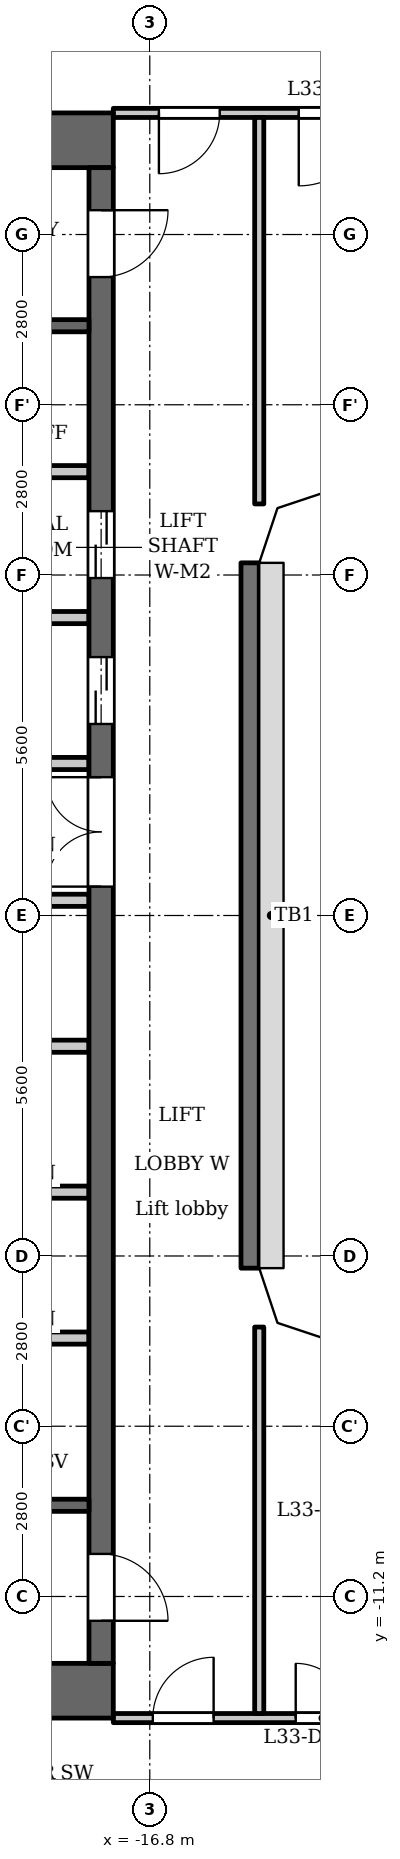
"""IFC4 building model, lengths in metres.
Left out: names, types, materials, properties, quantities, classifications, styles, units other than length and angle.
Written with IfcOpenShell. Run it as: python <this file> out.ifc"""

import sys

from ifc_helpers import new_model, si_unit, direction, frame, frame_2d, origin, place, context, subcontext, project, spatial, polyline, rectangle, outline, extrude, element, fill, save


model = new_model("IFC4")
c1 = context("Model", 3, precision=1e-05, world=origin(), true_north=direction((0.0, 1.0)))
c2 = subcontext(c1, "Body", "Model", "MODEL_VIEW")
j1 = project(units=[si_unit("LENGTHUNIT", "METRE"), si_unit("PLANEANGLEUNIT", "RADIAN")], contexts=[c1])
p1 = place(None, origin())
s1 = spatial("IfcSite", under=j1, at=p1, CompositionType="ELEMENT")
p2 = place(p1, origin())
s2 = spatial("IfcBuilding", under=s1, at=p2, CompositionType="ELEMENT")
p3 = place(p2, frame((0.0, 0.0, 130.7)))
s3 = spatial("IfcBuildingStorey", under=s2, at=p3, CompositionType="ELEMENT", Elevation=130.7)
p4 = place(p3, frame((-15.15, -5.8, 0.0), z_axis=(0.0, 0.0, 1.0), x_axis=(0.0, 1.0, 0.0)))
e1 = element("IfcWall", 1, at=p4, inside=s3, PredefinedType="SOLIDWALL", context=c2, shape_type="SweptSolid", body=[
    extrude(rectangle(XDim=11.6, YDim=0.3, at=frame_2d((5.8, 0.0))), origin(), (0.0, 0.0, 1.0), 5.1),
])
for number, where, z_axis, x_axis in (
    (2, (-17.4, 12.75, 0.0), (0.0, 0.0, 1.0), (-1.0, 0.0, 0.0)),
    (3, (-17.4, -12.75, 0.0), (0.0, 0.0, 1.0), (-1.0, 0.0, 0.0)),
):
    element("IfcWall", number, at=place(p3, frame(where, z_axis=z_axis, x_axis=x_axis)), inside=s3, PredefinedType="SHEAR", context=c2, shape_type="SweptSolid", body=[
        extrude(rectangle(XDim=10.4, YDim=0.9, at=frame_2d((5.2, 0.0))), origin(), (0.0, 0.0, 1.0), 5.1),
    ])
p5 = place(p3, frame((-17.6, -12.3, 0.0), z_axis=(0.0, 0.0, 1.0), x_axis=(0.0, 1.0, 0.0)))
e4 = element("IfcWall", 4, at=p5, inside=s3, PredefinedType="SHEAR", context=c2, shape_type="SweptSolid", body=[
    extrude(rectangle(XDim=24.6, YDim=0.4, at=frame_2d((12.3, 0.0))), origin(), (0.0, 0.0, 1.0), 5.1),
])
p6 = place(p5, frame((15.45, 0.0, 0.0)))
e5 = element("IfcOpeningElement", 5, at=p6, cuts=e4, PredefinedType="OPENING", context=c2, shape_type="SweptSolid", body=[
    extrude(rectangle(XDim=1.1, YDim=2.1, at=frame_2d((0.55, 1.05))), frame((0.0, 0.21, 0.0), z_axis=(0.0, -1.0, 0.0), x_axis=(1.0, 0.0, 0.0)), (0.0, 0.0, 1.0), 0.42),
])
p7 = place(p5, frame((17.85, 0.0, 0.0)))
e6 = element("IfcOpeningElement", 6, at=p7, cuts=e4, PredefinedType="OPENING", context=c2, shape_type="SweptSolid", body=[
    extrude(rectangle(XDim=1.1, YDim=2.1, at=frame_2d((0.55, 1.05))), frame((0.0, 0.21, 0.0), z_axis=(0.0, -1.0, 0.0), x_axis=(1.0, 0.0, 0.0)), (0.0, 0.0, 1.0), 0.42),
])
p8 = place(p5, frame((22.8, 0.0, 0.0)))
e7 = element("IfcOpeningElement", 7, at=p8, cuts=e4, PredefinedType="OPENING", context=c2, shape_type="SweptSolid", body=[
    extrude(rectangle(XDim=1.1, YDim=2.1, at=frame_2d((0.55, 1.05))), frame((0.0, 0.21, 0.0), z_axis=(0.0, -1.0, 0.0), x_axis=(1.0, 0.0, 0.0)), (0.0, 0.0, 1.0), 0.42),
])
p9 = place(p5, frame((0.7, 0.0, 0.0)))
e8 = element("IfcOpeningElement", 8, at=p9, cuts=e4, PredefinedType="OPENING", context=c2, shape_type="SweptSolid", body=[
    extrude(rectangle(XDim=1.1, YDim=2.1, at=frame_2d((0.55, 1.05))), frame((0.0, 0.21, 0.0), z_axis=(0.0, -1.0, 0.0), x_axis=(1.0, 0.0, 0.0)), (0.0, 0.0, 1.0), 0.42),
])
p10 = place(p5, frame((12.775, 0.0, 0.0)))
e9 = element("IfcOpeningElement", 9, at=p10, cuts=e4, PredefinedType="OPENING", context=c2, shape_type="SweptSolid", body=[
    extrude(rectangle(XDim=1.8, YDim=2.1, at=frame_2d((0.9, 1.05))), frame((0.0, 0.21, 0.0), z_axis=(0.0, -1.0, 0.0), x_axis=(1.0, 0.0, 0.0)), (0.0, 0.0, 1.0), 0.42),
])
p11 = place(p3, frame((-17.8, -9.7, 0.0), z_axis=(0.0, 0.0, 1.0), x_axis=(-1.0, 0.0, 0.0)))
e10 = element("IfcWall", 10, at=p11, inside=s3, PredefinedType="SHEAR", context=c2, shape_type="SweptSolid", body=[
    extrude(rectangle(XDim=8.3, YDim=0.2, at=frame_2d((4.15, 0.0))), origin(), (0.0, 0.0, 1.0), 5.1),
])
p12 = place(p11, frame((0.85, 0.0, 0.0)))
e11 = element("IfcOpeningElement", 11, at=p12, cuts=e10, PredefinedType="OPENING", context=c2, shape_type="SweptSolid", body=[
    extrude(rectangle(XDim=1.1, YDim=2.1, at=frame_2d((0.55, 1.05))), frame((0.0, 0.11, 0.0), z_axis=(0.0, -1.0, 0.0), x_axis=(1.0, 0.0, 0.0)), (0.0, 0.0, 1.0), 0.22),
])
p13 = place(p11, frame((3.75, 0.0, 0.0)))
e12 = element("IfcOpeningElement", 12, at=p13, cuts=e10, PredefinedType="OPENING", context=c2, shape_type="SweptSolid", body=[
    extrude(rectangle(XDim=1.1, YDim=2.1, at=frame_2d((0.55, 1.05))), frame((0.0, 0.11, 0.0), z_axis=(0.0, -1.0, 0.0), x_axis=(1.0, 0.0, 0.0)), (0.0, 0.0, 1.0), 0.22),
])
for number, where, z_axis, x_axis in (
    (13, (-17.8, -6.95, 0.0), (0.0, 0.0, 1.0), (-1.0, 0.0, 0.0)),
    (14, (-17.8, -4.55, 0.0), (0.0, 0.0, 1.0), (-1.0, 0.0, 0.0)),
    (15, (-17.8, -2.15, 0.0), (0.0, 0.0, 1.0), (-1.0, 0.0, 0.0)),
):
    element("IfcWall", number, at=place(p3, frame(where, z_axis=z_axis, x_axis=x_axis)), inside=s3, PredefinedType="PARTITIONING", context=c2, shape_type="SweptSolid", body=[
        extrude(rectangle(XDim=2.8, YDim=0.2, at=frame_2d((1.4, 0.0))), origin(), (0.0, 0.0, 1.0), 5.1),
    ])
for number, where, z_axis, x_axis in (
    (16, (-17.8, 0.25, 0.0), (0.0, 0.0, 1.0), (-1.0, 0.0, 0.0)),
    (17, (-17.8, 2.5, 0.0), (0.0, 0.0, 1.0), (-1.0, 0.0, 0.0)),
):
    element("IfcWall", number, at=place(p3, frame(where, z_axis=z_axis, x_axis=x_axis)), inside=s3, PredefinedType="PARTITIONING", context=c2, shape_type="SweptSolid", body=[
        extrude(rectangle(XDim=3.0, YDim=0.2, at=frame_2d((1.5, 0.0))), origin(), (0.0, 0.0, 1.0), 5.1),
    ])
for number, where, z_axis, x_axis in (
    (18, (-17.8, 4.9, 0.0), (0.0, 0.0, 1.0), (-1.0, 0.0, 0.0)),
    (19, (-17.8, 7.3, 0.0), (0.0, 0.0, 1.0), (-1.0, 0.0, 0.0)),
):
    element("IfcWall", number, at=place(p3, frame(where, z_axis=z_axis, x_axis=x_axis)), inside=s3, PredefinedType="PARTITIONING", context=c2, shape_type="SweptSolid", body=[
        extrude(rectangle(XDim=2.8, YDim=0.2, at=frame_2d((1.4, 0.0))), origin(), (0.0, 0.0, 1.0), 5.1),
    ])
p14 = place(p3, frame((-17.8, 9.7, 0.0), z_axis=(0.0, 0.0, 1.0), x_axis=(-1.0, 0.0, 0.0)))
e20 = element("IfcWall", 20, at=p14, inside=s3, PredefinedType="SHEAR", context=c2, shape_type="SweptSolid", body=[
    extrude(rectangle(XDim=8.3, YDim=0.2, at=frame_2d((4.15, 0.0))), origin(), (0.0, 0.0, 1.0), 5.1),
])
p15 = place(p14, frame((0.85, 0.0, 0.0)))
e21 = element("IfcOpeningElement", 21, at=p15, cuts=e20, PredefinedType="OPENING", context=c2, shape_type="SweptSolid", body=[
    extrude(rectangle(XDim=1.1, YDim=2.1, at=frame_2d((0.55, 1.05))), frame((0.0, 0.11, 0.0), z_axis=(0.0, -1.0, 0.0), x_axis=(1.0, 0.0, 0.0)), (0.0, 0.0, 1.0), 0.22),
])
p16 = place(p14, frame((3.75, 0.0, 0.0)))
e22 = element("IfcOpeningElement", 22, at=p16, cuts=e20, PredefinedType="OPENING", context=c2, shape_type="SweptSolid", body=[
    extrude(rectangle(XDim=1.1, YDim=2.1, at=frame_2d((0.55, 1.05))), frame((0.0, 0.11, 0.0), z_axis=(0.0, -1.0, 0.0), x_axis=(1.0, 0.0, 0.0)), (0.0, 0.0, 1.0), 0.22),
])
p17 = place(p3, frame((-17.4, -13.2, 0.0), z_axis=(0.0, 0.0, 1.0), x_axis=(1.0, 0.0, 0.0)))
e23 = element("IfcWall", 23, at=p17, inside=s3, PredefinedType="PARTITIONING", context=c2, shape_type="SweptSolid", body=[
    extrude(rectangle(XDim=5.88, YDim=0.15, at=frame_2d((2.94, 0.0))), origin(), (0.0, 0.0, 1.0), 5.1),
])
p18 = place(p17, frame((0.65, 0.0, 0.0)))
e24 = element("IfcOpeningElement", 24, at=p18, cuts=e23, PredefinedType="OPENING", context=c2, shape_type="SweptSolid", body=[
    extrude(rectangle(XDim=1.0, YDim=2.1, at=frame_2d((0.5, 1.05))), frame((0.0, 0.085, 0.0), z_axis=(0.0, -1.0, 0.0), x_axis=(1.0, 0.0, 0.0)), (0.0, 0.0, 1.0), 0.17),
])
p19 = place(p17, frame((4.81, 0.0, 0.0)))
e25 = element("IfcOpeningElement", 25, at=p19, cuts=e23, PredefinedType="OPENING", context=c2, shape_type="SweptSolid", body=[
    extrude(rectangle(XDim=0.9, YDim=2.1, at=frame_2d((0.45, 1.05))), frame((0.0, 0.085, 0.0), z_axis=(0.0, -1.0, 0.0), x_axis=(1.0, 0.0, 0.0)), (0.0, 0.0, 1.0), 0.17),
])
p20 = place(p17, frame((3.0, 0.0, 0.0)))
e26 = element("IfcOpeningElement", 26, at=p20, cuts=e23, PredefinedType="OPENING", context=c2, shape_type="SweptSolid", body=[
    extrude(rectangle(XDim=0.9, YDim=2.1, at=frame_2d((0.45, 1.05))), frame((0.0, 0.085, 0.0), z_axis=(0.0, -1.0, 0.0), x_axis=(1.0, 0.0, 0.0)), (0.0, 0.0, 1.0), 0.17),
])
p21 = place(p3, frame((-17.4, 13.2, 0.0), z_axis=(0.0, 0.0, 1.0), x_axis=(1.0, 0.0, 0.0)))
e27 = element("IfcWall", 27, at=p21, inside=s3, PredefinedType="PARTITIONING", context=c2, shape_type="SweptSolid", body=[
    extrude(rectangle(XDim=5.88, YDim=0.15, at=frame_2d((2.94, 0.0))), origin(), (0.0, 0.0, 1.0), 5.1),
])
p22 = place(p21, frame((0.75, 0.0, 0.0)))
e28 = element("IfcOpeningElement", 28, at=p22, cuts=e27, PredefinedType="OPENING", context=c2, shape_type="SweptSolid", body=[
    extrude(rectangle(XDim=1.0, YDim=2.1, at=frame_2d((0.5, 1.05))), frame((0.0, 0.085, 0.0), z_axis=(0.0, -1.0, 0.0), x_axis=(1.0, 0.0, 0.0)), (0.0, 0.0, 1.0), 0.17),
])
p23 = place(p21, frame((3.05, 0.0, 0.0)))
e29 = element("IfcOpeningElement", 29, at=p23, cuts=e27, PredefinedType="OPENING", context=c2, shape_type="SweptSolid", body=[
    extrude(rectangle(XDim=1.2, YDim=2.1, at=frame_2d((0.6, 1.05))), frame((0.0, 0.085, 0.0), z_axis=(0.0, -1.0, 0.0), x_axis=(1.0, 0.0, 0.0)), (0.0, 0.0, 1.0), 0.17),
])
for number, where, z_axis, x_axis in (
    (30, (-15.0, -13.125, 0.0), (0.0, 0.0, 1.0), (0.0, 1.0, 0.0)),
    (31, (-15.0, 6.769, 0.0), (0.0, 0.0, 1.0), (0.0, 1.0, 0.0)),
):
    element("IfcWall", number, at=place(p3, frame(where, z_axis=z_axis, x_axis=x_axis)), inside=s3, PredefinedType="PARTITIONING", context=c2, shape_type="SweptSolid", body=[
        extrude(rectangle(XDim=6.356, YDim=0.15, at=frame_2d((3.178, 0.0))), origin(), (0.0, 0.0, 1.0), 5.1),
    ])
p24 = place(p3, origin())
e32 = element("IfcWall", 32, at=p24, inside=s3, PredefinedType="SOLIDWALL", context=c2, shape_type="SweptSolid", body=[
    extrude(outline(polyline([(-15.0, 5.8), (-14.7, 6.7), (-13.8, 7.0), (-13.8, 7.3), (-13.849, 7.3), (-14.937, 6.937), (-15.3, 5.849), (-15.3, 5.8), (-15.0, 5.8)])), origin(), (0.0, 0.0, 1.0), 5.1),
])
e33 = element("IfcWall", 33, at=p24, inside=s3, PredefinedType="SOLIDWALL", context=c2, shape_type="SweptSolid", body=[
    extrude(outline(polyline([(-13.8, -7.0), (-14.7, -6.7), (-15.0, -5.8), (-15.3, -5.8), (-15.3, -5.849), (-14.937, -6.937), (-13.849, -7.3), (-13.8, -7.3), (-13.8, -7.0)])), origin(), (0.0, 0.0, 1.0), 5.1),
])
p25 = place(p6, origin())
e34 = element("IfcDoor", 34, at=p25, inside=s3, OperationType="DOUBLE_DOOR_SLIDING", PredefinedType="DOOR", context=c2, shape_type="SweptSolid", body=[
    extrude(rectangle(XDim=1.1, YDim=2.1, at=frame_2d((0.55, 1.05))), frame((0.0, 0.025, 0.0), z_axis=(0.0, -1.0, 0.0), x_axis=(1.0, 0.0, 0.0)), (0.0, 0.0, 1.0), 0.05),
])
fill(e5, e34)
p26 = place(p7, origin())
e35 = element("IfcDoor", 35, at=p26, inside=s3, OperationType="DOUBLE_DOOR_SLIDING", PredefinedType="DOOR", context=c2, shape_type="SweptSolid", body=[
    extrude(rectangle(XDim=1.1, YDim=2.1, at=frame_2d((0.55, 1.05))), frame((0.0, 0.025, 0.0), z_axis=(0.0, -1.0, 0.0), x_axis=(1.0, 0.0, 0.0)), (0.0, 0.0, 1.0), 0.05),
])
fill(e6, e35)
p27 = place(p8, origin())
e36 = element("IfcDoor", 36, at=p27, inside=s3, OperationType="SINGLE_SWING_RIGHT", PredefinedType="DOOR", context=c2, shape_type="SweptSolid", body=[
    extrude(rectangle(XDim=1.1, YDim=2.1, at=frame_2d((0.55, 1.05))), frame((0.0, 0.025, 0.0), z_axis=(0.0, -1.0, 0.0), x_axis=(1.0, 0.0, 0.0)), (0.0, 0.0, 1.0), 0.05),
])
fill(e7, e36)
p28 = place(p9, origin())
e37 = element("IfcDoor", 37, at=p28, inside=s3, OperationType="SINGLE_SWING_LEFT", PredefinedType="DOOR", context=c2, shape_type="SweptSolid", body=[
    extrude(rectangle(XDim=1.1, YDim=2.1, at=frame_2d((0.55, 1.05))), frame((0.0, 0.025, 0.0), z_axis=(0.0, -1.0, 0.0), x_axis=(1.0, 0.0, 0.0)), (0.0, 0.0, 1.0), 0.05),
])
fill(e8, e37)
p29 = place(p10, origin())
e38 = element("IfcDoor", 38, at=p29, inside=s3, OperationType="DOUBLE_DOOR_SINGLE_SWING", PredefinedType="DOOR", context=c2, shape_type="SweptSolid", body=[
    extrude(rectangle(XDim=1.8, YDim=2.1, at=frame_2d((0.9, 1.05))), frame((0.0, 0.025, 0.0), z_axis=(0.0, -1.0, 0.0), x_axis=(1.0, 0.0, 0.0)), (0.0, 0.0, 1.0), 0.05),
])
fill(e9, e38)
p30 = place(p22, origin())
e39 = element("IfcDoor", 39, at=p30, inside=s3, OperationType="SINGLE_SWING_LEFT", PredefinedType="DOOR", context=c2, shape_type="SweptSolid", body=[
    extrude(rectangle(XDim=1.0, YDim=2.1, at=frame_2d((0.5, 1.05))), frame((0.0, 0.025, 0.0), z_axis=(0.0, -1.0, 0.0), x_axis=(1.0, 0.0, 0.0)), (0.0, 0.0, 1.0), 0.05),
])
fill(e28, e39)
p31 = place(p23, origin())
e40 = element("IfcDoor", 40, at=p31, inside=s3, OperationType="SINGLE_SWING_LEFT", PredefinedType="DOOR", context=c2, shape_type="SweptSolid", body=[
    extrude(rectangle(XDim=1.2, YDim=2.1, at=frame_2d((0.6, 1.05))), frame((0.0, 0.025, 0.0), z_axis=(0.0, -1.0, 0.0), x_axis=(1.0, 0.0, 0.0)), (0.0, 0.0, 1.0), 0.05),
])
fill(e29, e40)
p32 = place(p18, origin())
e41 = element("IfcDoor", 41, at=p32, inside=s3, OperationType="SINGLE_SWING_LEFT", PredefinedType="DOOR", context=c2, shape_type="SweptSolid", body=[
    extrude(rectangle(XDim=1.0, YDim=2.1, at=frame_2d((0.5, 1.05))), frame((0.0, 0.025, 0.0), z_axis=(0.0, -1.0, 0.0), x_axis=(1.0, 0.0, 0.0)), (0.0, 0.0, 1.0), 0.05),
])
fill(e24, e41)
p33 = place(p20, origin())
e42 = element("IfcDoor", 42, at=p33, inside=s3, OperationType="SINGLE_SWING_RIGHT", PredefinedType="DOOR", context=c2, shape_type="SweptSolid", body=[
    extrude(rectangle(XDim=0.9, YDim=2.1, at=frame_2d((0.45, 1.05))), frame((0.0, 0.025, 0.0), z_axis=(0.0, -1.0, 0.0), x_axis=(1.0, 0.0, 0.0)), (0.0, 0.0, 1.0), 0.05),
])
fill(e26, e42)
save(model, sys.argv[1])
